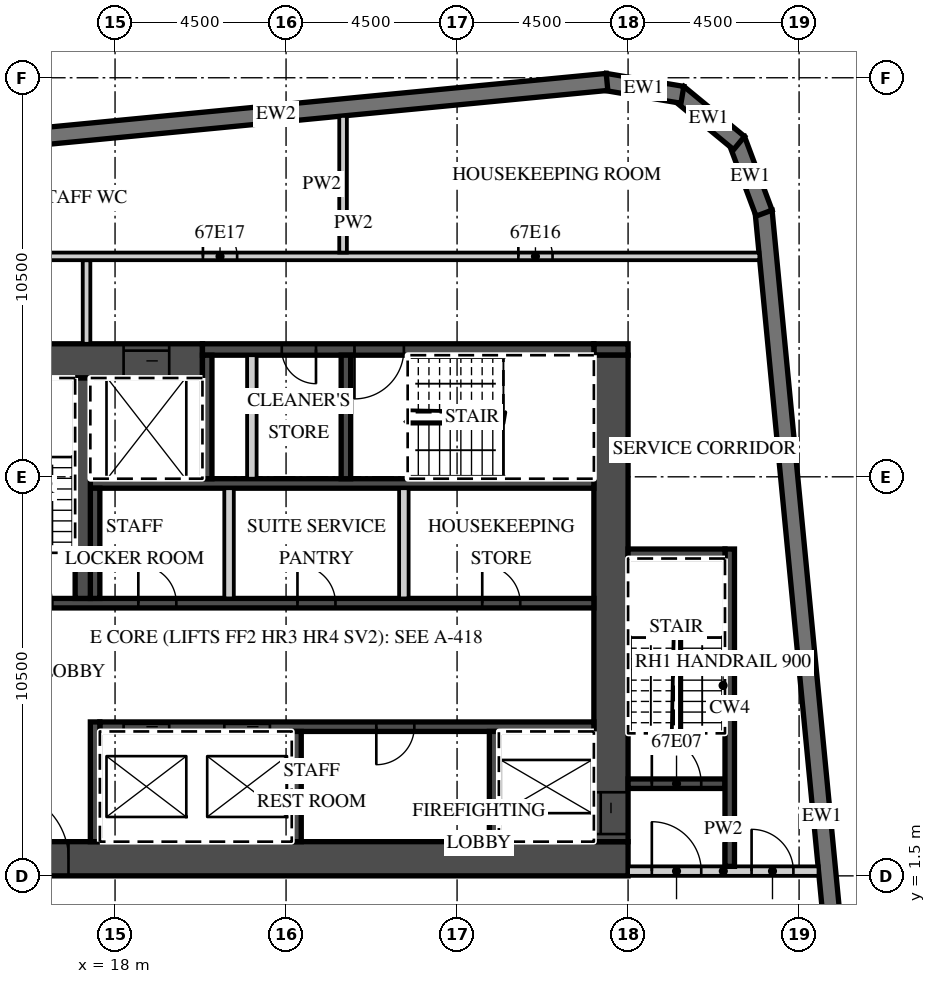
"""IFC4 building model, lengths in metres.
Left out: names, types, materials, properties, quantities, classifications, styles, units other than length and angle.
Written with IfcOpenShell. Run it as: python <this file> out.ifc"""

import sys

from ifc_helpers import new_model, si_unit, direction, frame, frame_2d, origin, place, context, subcontext, project, spatial, polyline, rectangle, outline, extrude, element, fill, save


model = new_model("IFC4")
c1 = context("Model", 3, precision=1e-05, world=origin(), true_north=direction((0.0, 1.0)))
c2 = subcontext(c1, "Body", "Model", "MODEL_VIEW")
j1 = project(units=[si_unit("LENGTHUNIT", "METRE"), si_unit("PLANEANGLEUNIT", "RADIAN")], contexts=[c1])
p1 = place(None, origin())
s1 = spatial("IfcSite", under=j1, at=p1, CompositionType="ELEMENT")
p2 = place(p1, origin())
s2 = spatial("IfcBuilding", under=s1, at=p2, CompositionType="ELEMENT")
p3 = place(p2, frame((0.0, 0.0, 271.8)))
s3 = spatial("IfcBuildingStorey", under=s2, at=p3, CompositionType="ELEMENT", Elevation=271.8)
p4 = place(p3, frame((38.132, -12.858, 0.0), z_axis=(0.0, 0.0, 1.0), x_axis=(-0.095847749461, 0.995396006082, 0.0)))
e1 = element("IfcWall", 1, at=p4, inside=s3, PredefinedType="SOLIDWALL", context=c2, shape_type="SweptSolid", body=[
    extrude(rectangle(XDim=32.0, YDim=0.45, at=frame_2d((16.0, 0.0))), origin(), (0.0, 0.0, 1.0), 3.02),
])
p5 = place(p3, frame((35.078, 18.938, 0.0), z_axis=(0.0, 0.0, 1.0), x_axis=(-0.350192909346, 0.936677599948, 0.0)))
e2 = element("IfcWall", 2, at=p5, inside=s3, PredefinedType="SOLIDWALL", context=c2, shape_type="SweptSolid", body=[
    extrude(outline(polyline([(0.0, -0.225), (2.071, -0.225), (1.95, 0.225), (0.121, 0.225), (0.0, -0.225)])), origin(), (0.0, 0.0, 1.0), 3.02),
])
p6 = place(p3, frame((34.421, 20.782, 0.0), z_axis=(0.0, 0.0, 1.0), x_axis=(-0.771593176315, 0.636116318187, 0.0)))
e3 = element("IfcWall", 3, at=p6, inside=s3, PredefinedType="SOLIDWALL", context=c2, shape_type="SweptSolid", body=[
    extrude(outline(polyline([(0.0, -0.225), (2.071, -0.225), (1.95, 0.225), (0.12, 0.225), (0.0, -0.225)])), origin(), (0.0, 0.0, 1.0), 3.02),
])
p7 = place(p3, frame((32.929, 22.051, 0.0), z_axis=(0.0, 0.0, 1.0), x_axis=(-0.986298144721, 0.164972633245, 0.0)))
e4 = element("IfcWall", 4, at=p7, inside=s3, PredefinedType="SOLIDWALL", context=c2, shape_type="SweptSolid", body=[
    extrude(outline(polyline([(0.0, -0.225), (2.07, -0.225), (1.95, 0.225), (0.121, 0.225), (0.0, -0.225)])), origin(), (0.0, 0.0, 1.0), 3.02),
])
p8 = place(p3, frame((30.946, 22.391, 0.0), z_axis=(0.0, 0.0, 1.0), x_axis=(-0.995396397117, -0.095843688398, 0.0)))
e5 = element("IfcWall", 5, at=p8, inside=s3, PredefinedType="SOLIDWALL", context=c2, shape_type="SweptSolid", body=[
    extrude(rectangle(XDim=17.505, YDim=0.45, at=frame_2d((8.752, 0.0))), origin(), (0.0, 0.0, 1.0), 3.02),
])
p9 = place(p3, frame((13.5, 1.95, 0.0), z_axis=(0.0, 0.0, 1.0), x_axis=(1.0, 0.0, 0.0)))
e6 = element("IfcWall", 6, at=p9, inside=s3, PredefinedType="SHEAR", context=c2, shape_type="SweptSolid", body=[
    extrude(rectangle(XDim=18.0, YDim=0.9, at=frame_2d((9.0, 0.0))), origin(), (0.0, 0.0, 1.0), 3.02),
])
p10 = place(p9, frame((1.475, 0.0, 0.0)))
e7 = element("IfcOpeningElement", 7, at=p10, cuts=e6, PredefinedType="OPENING", context=c2, shape_type="SweptSolid", body=[
    extrude(rectangle(XDim=1.8, YDim=2.1, at=frame_2d((0.9, 1.05))), frame((0.0, 0.46, 0.0), z_axis=(0.0, -1.0, 0.0), x_axis=(1.0, 0.0, 0.0)), (0.0, 0.0, 1.0), 0.92),
])
p11 = place(p3, frame((13.5, 15.05, 0.0), z_axis=(0.0, 0.0, 1.0), x_axis=(1.0, 0.0, 0.0)))
e8 = element("IfcWall", 8, at=p11, inside=s3, PredefinedType="SHEAR", context=c2, shape_type="SweptSolid", body=[
    extrude(rectangle(XDim=6.8, YDim=0.9, at=frame_2d((3.4, 0.0))), origin(), (0.0, 0.0, 1.0), 3.02),
])
p12 = place(p11, frame((4.725, 0.0, 0.0)))
e9 = element("IfcOpeningElement", 9, at=p12, cuts=e8, PredefinedType="OPENING", context=c2, shape_type="SweptSolid", body=[
    extrude(rectangle(XDim=1.2, YDim=2.1, at=frame_2d((0.6, 1.05))), frame((0.0, 0.46, 0.0), z_axis=(0.0, -1.0, 0.0), x_axis=(1.0, 0.0, 0.0)), (0.0, 0.0, 1.0), 0.92),
])
p13 = place(p3, frame((30.6, 15.35, 0.0), z_axis=(0.0, 0.0, 1.0), x_axis=(1.0, 0.0, 0.0)))
e10 = element("IfcWall", 10, at=p13, inside=s3, PredefinedType="SHEAR", context=c2, shape_type="SweptSolid", body=[
    extrude(rectangle(XDim=0.9, YDim=0.3, at=frame_2d((0.45, 0.0))), origin(), (0.0, 0.0, 1.0), 3.02),
])
p14 = place(p3, frame((20.3, 15.35, 0.0), z_axis=(0.0, 0.0, 1.0), x_axis=(1.0, 0.0, 0.0)))
e11 = element("IfcWall", 11, at=p14, inside=s3, PredefinedType="SHEAR", context=c2, shape_type="SweptSolid", body=[
    extrude(rectangle(XDim=10.3, YDim=0.3, at=frame_2d((5.15, 0.0))), origin(), (0.0, 0.0, 1.0), 3.02),
])
p15 = place(p14, frame((4.0, 0.0, 0.0)))
e12 = element("IfcOpeningElement", 12, at=p15, cuts=e11, PredefinedType="OPENING", context=c2, shape_type="SweptSolid", body=[
    extrude(rectangle(XDim=1.3, YDim=2.1, at=frame_2d((0.65, 1.05))), frame((0.0, 0.16, 0.0), z_axis=(0.0, -1.0, 0.0), x_axis=(1.0, 0.0, 0.0)), (0.0, 0.0, 1.0), 0.32),
])
p16 = place(p14, frame((2.087, 0.0, 0.0)))
e13 = element("IfcOpeningElement", 13, at=p16, cuts=e11, PredefinedType="OPENING", context=c2, shape_type="SweptSolid", body=[
    extrude(rectangle(XDim=0.9, YDim=2.1, at=frame_2d((0.45, 1.05))), frame((0.0, 0.16, 0.0), z_axis=(0.0, -1.0, 0.0), x_axis=(1.0, 0.0, 0.0)), (0.0, 0.0, 1.0), 0.32),
])
p17 = place(p3, frame((31.05, 2.4, 0.0), z_axis=(0.0, 0.0, 1.0), x_axis=(0.0, 1.0, 0.0)))
e14 = element("IfcWall", 14, at=p17, inside=s3, PredefinedType="SHEAR", context=c2, shape_type="SweptSolid", body=[
    extrude(rectangle(XDim=12.8, YDim=0.9, at=frame_2d((6.4, 0.0))), origin(), (0.0, 0.0, 1.0), 3.02),
])
p18 = place(p17, frame((0.2, 0.0, 0.0)))
e15 = element("IfcOpeningElement", 15, at=p18, cuts=e14, PredefinedType="OPENING", context=c2, shape_type="SweptSolid", body=[
    extrude(rectangle(XDim=1.1, YDim=2.1, at=frame_2d((0.55, 1.05))), frame((0.0, 0.46, 0.0), z_axis=(0.0, -1.0, 0.0), x_axis=(1.0, 0.0, 0.0)), (0.0, 0.0, 1.0), 0.92),
])
p19 = place(p3, frame((17.6, 5.425, 0.0), z_axis=(0.0, 0.0, 1.0), x_axis=(1.0, 0.0, 0.0)))
e16 = element("IfcWall", 16, at=p19, inside=s3, PredefinedType="SHEAR", context=c2, shape_type="SweptSolid", body=[
    extrude(rectangle(XDim=13.0, YDim=0.25, at=frame_2d((6.5, 0.0))), origin(), (0.0, 0.0, 1.0), 3.02),
])
p20 = place(p19, frame((3.275, 0.0, 0.0)))
e17 = element("IfcOpeningElement", 17, at=p20, cuts=e16, PredefinedType="OPENING", context=c2, shape_type="SweptSolid", body=[
    extrude(rectangle(XDim=1.2, YDim=2.1, at=frame_2d((0.6, 1.05))), frame((0.0, 0.135, 0.0), z_axis=(0.0, -1.0, 0.0), x_axis=(1.0, 0.0, 0.0)), (0.0, 0.0, 1.0), 0.27),
])
p21 = place(p19, frame((0.625, 0.0, 0.0)))
e18 = element("IfcOpeningElement", 18, at=p21, cuts=e16, PredefinedType="OPENING", context=c2, shape_type="SweptSolid", body=[
    extrude(rectangle(XDim=1.2, YDim=2.1, at=frame_2d((0.6, 1.05))), frame((0.0, 0.135, 0.0), z_axis=(0.0, -1.0, 0.0), x_axis=(1.0, 0.0, 0.0)), (0.0, 0.0, 1.0), 0.27),
])
p22 = place(p19, frame((7.275, 0.0, 0.0)))
e19 = element("IfcOpeningElement", 19, at=p22, cuts=e16, PredefinedType="OPENING", context=c2, shape_type="SweptSolid", body=[
    extrude(rectangle(XDim=1.0, YDim=2.1, at=frame_2d((0.5, 1.05))), frame((0.0, 0.135, 0.0), z_axis=(0.0, -1.0, 0.0), x_axis=(1.0, 0.0, 0.0)), (0.0, 0.0, 1.0), 0.27),
])
p23 = place(p3, frame((17.475, 2.4, 0.0), z_axis=(0.0, 0.0, 1.0), x_axis=(0.0, 1.0, 0.0)))
e20 = element("IfcWall", 20, at=p23, inside=s3, PredefinedType="SHEAR", context=c2, shape_type="SweptSolid", body=[
    extrude(rectangle(XDim=3.15, YDim=0.25, at=frame_2d((1.575, 0.0))), origin(), (0.0, 0.0, 1.0), 3.02),
])
for number, where, z_axis, x_axis in (
    (21, (27.975, 2.4, 0.0), (0.0, 0.0, 1.0), (0.0, 1.0, 0.0)),
    (22, (22.775, 2.4, 0.0), (0.0, 0.0, 1.0), (0.0, 1.0, 0.0)),
):
    element("IfcWall", number, at=place(p3, frame(where, z_axis=z_axis, x_axis=x_axis)), inside=s3, PredefinedType="SHEAR", context=c2, shape_type="SweptSolid", body=[
        extrude(rectangle(XDim=2.9, YDim=0.25, at=frame_2d((1.45, 0.0))), origin(), (0.0, 0.0, 1.0), 3.02),
    ])
p24 = place(p3, frame((14.4, 8.675, 0.0), z_axis=(0.0, 0.0, 1.0), x_axis=(1.0, 0.0, 0.0)))
e23 = element("IfcWall", 23, at=p24, inside=s3, PredefinedType="SHEAR", context=c2, shape_type="SweptSolid", body=[
    extrude(rectangle(XDim=16.2, YDim=0.25, at=frame_2d((8.1, 0.0))), origin(), (0.0, 0.0, 1.0), 3.02),
])
p25 = place(p24, frame((0.65, 0.0, 0.0)))
e24 = element("IfcOpeningElement", 24, at=p25, cuts=e23, PredefinedType="OPENING", context=c2, shape_type="SweptSolid", body=[
    extrude(rectangle(XDim=1.3, YDim=2.1, at=frame_2d((0.65, 1.05))), frame((0.0, 0.135, 0.0), z_axis=(0.0, -1.0, 0.0), x_axis=(1.0, 0.0, 0.0)), (0.0, 0.0, 1.0), 0.27),
])
p26 = place(p24, frame((13.262, 0.0, 0.0)))
e25 = element("IfcOpeningElement", 25, at=p26, cuts=e23, PredefinedType="OPENING", context=c2, shape_type="SweptSolid", body=[
    extrude(rectangle(XDim=1.0, YDim=2.1, at=frame_2d((0.5, 1.05))), frame((0.0, 0.135, 0.0), z_axis=(0.0, -1.0, 0.0), x_axis=(1.0, 0.0, 0.0)), (0.0, 0.0, 1.0), 0.27),
])
p27 = place(p24, frame((8.4, 0.0, 0.0)))
e26 = element("IfcOpeningElement", 26, at=p27, cuts=e23, PredefinedType="OPENING", context=c2, shape_type="SweptSolid", body=[
    extrude(rectangle(XDim=1.0, YDim=2.1, at=frame_2d((0.5, 1.05))), frame((0.0, 0.135, 0.0), z_axis=(0.0, -1.0, 0.0), x_axis=(1.0, 0.0, 0.0)), (0.0, 0.0, 1.0), 0.27),
])
p28 = place(p24, frame((4.212, 0.0, 0.0)))
e27 = element("IfcOpeningElement", 27, at=p28, cuts=e23, PredefinedType="OPENING", context=c2, shape_type="SweptSolid", body=[
    extrude(rectangle(XDim=1.0, YDim=2.1, at=frame_2d((0.5, 1.05))), frame((0.0, 0.135, 0.0), z_axis=(0.0, -1.0, 0.0), x_axis=(1.0, 0.0, 0.0)), (0.0, 0.0, 1.0), 0.27),
])
p29 = place(p3, frame((17.35, 11.825, 0.0), z_axis=(0.0, 0.0, 1.0), x_axis=(1.0, 0.0, 0.0)))
e28 = element("IfcWall", 28, at=p29, inside=s3, PredefinedType="SHEAR", context=c2, shape_type="SweptSolid", body=[
    extrude(rectangle(XDim=13.25, YDim=0.25, at=frame_2d((6.625, 0.0))), origin(), (0.0, 0.0, 1.0), 3.02),
])
p30 = place(p3, frame((17.475, 8.8, 0.0), z_axis=(0.0, 0.0, 1.0), x_axis=(0.0, 1.0, 0.0)))
e29 = element("IfcWall", 29, at=p30, inside=s3, PredefinedType="SHEAR", context=c2, shape_type="SweptSolid", body=[
    extrude(rectangle(XDim=2.9, YDim=0.25, at=frame_2d((1.45, 0.0))), origin(), (0.0, 0.0, 1.0), 3.02),
])
for number, where, z_axis, x_axis in (
    (30, (25.6, 8.8, 0.0), (0.0, 0.0, 1.0), (0.0, 1.0, 0.0)),
    (31, (21.0, 8.8, 0.0), (0.0, 0.0, 1.0), (0.0, 1.0, 0.0)),
):
    element("IfcWall", number, at=place(p3, frame(where, z_axis=z_axis, x_axis=x_axis)), inside=s3, PredefinedType="PARTITIONING", context=c2, shape_type="SweptSolid", body=[
        extrude(rectangle(XDim=2.9, YDim=0.25, at=frame_2d((1.45, 0.0))), origin(), (0.0, 0.0, 1.0), 3.02),
    ])
p31 = place(p3, frame((17.15, 8.8, 0.0), z_axis=(0.0, 0.0, 1.0), x_axis=(0.0, 1.0, 0.0)))
e32 = element("IfcWall", 32, at=p31, inside=s3, PredefinedType="SHEAR", context=c2, shape_type="SweptSolid", body=[
    extrude(rectangle(XDim=5.8, YDim=0.4, at=frame_2d((2.9, 0.0))), origin(), (0.0, 0.0, 1.0), 3.02),
])
for number, where, z_axis, x_axis in (
    (33, (20.425, 11.95, 0.0), (0.0, 0.0, 1.0), (0.0, 1.0, 0.0)),
    (34, (24.075, 11.95, 0.0), (0.0, 0.0, 1.0), (0.0, 1.0, 0.0)),
):
    element("IfcWall", number, at=place(p3, frame(where, z_axis=z_axis, x_axis=x_axis)), inside=s3, PredefinedType="SHEAR", context=c2, shape_type="SweptSolid", body=[
        extrude(rectangle(XDim=3.25, YDim=0.25, at=frame_2d((1.625, 0.0))), origin(), (0.0, 0.0, 1.0), 3.02),
    ])
p32 = place(p3, frame((21.6, 11.95, 0.0), z_axis=(0.0, 0.0, 1.0), x_axis=(0.0, 1.0, 0.0)))
e35 = element("IfcWall", 35, at=p32, inside=s3, PredefinedType="PARTITIONING", context=c2, shape_type="SweptSolid", body=[
    extrude(rectangle(XDim=3.25, YDim=0.25, at=frame_2d((1.625, 0.0))), origin(), (0.0, 0.0, 1.0), 3.02),
])
p33 = place(p3, frame((31.5, 1.625, 0.0), z_axis=(0.0, 0.0, 1.0), x_axis=(1.0, 0.0, 0.0)))
e36 = element("IfcWall", 36, at=p33, inside=s3, PredefinedType="PARTITIONING", context=c2, shape_type="SweptSolid", body=[
    extrude(rectangle(XDim=5.012, YDim=0.25, at=frame_2d((2.506, 0.0))), origin(), (0.0, 0.0, 1.0), 3.02),
])
p34 = place(p33, frame((0.625, 0.0, 0.0)))
e37 = element("IfcOpeningElement", 37, at=p34, cuts=e36, PredefinedType="OPENING", context=c2, shape_type="SweptSolid", body=[
    extrude(rectangle(XDim=1.3, YDim=2.1, at=frame_2d((0.65, 1.05))), frame((0.0, 0.135, 0.0), z_axis=(0.0, -1.0, 0.0), x_axis=(1.0, 0.0, 0.0)), (0.0, 0.0, 1.0), 0.27),
])
p35 = place(p33, frame((3.25, 0.0, 0.0)))
e38 = element("IfcOpeningElement", 38, at=p35, cuts=e36, PredefinedType="OPENING", context=c2, shape_type="SweptSolid", body=[
    extrude(rectangle(XDim=1.1, YDim=2.1, at=frame_2d((0.55, 1.05))), frame((0.0, 0.135, 0.0), z_axis=(0.0, -1.0, 0.0), x_axis=(1.0, 0.0, 0.0)), (0.0, 0.0, 1.0), 0.27),
])
p36 = place(p3, frame((31.5, 3.925, 0.0), z_axis=(0.0, 0.0, 1.0), x_axis=(1.0, 0.0, 0.0)))
e39 = element("IfcWall", 39, at=p36, inside=s3, PredefinedType="SHEAR", context=c2, shape_type="SweptSolid", body=[
    extrude(rectangle(XDim=2.55, YDim=0.25, at=frame_2d((1.275, 0.0))), origin(), (0.0, 0.0, 1.0), 3.02),
])
p37 = place(p36, frame((0.625, 0.0, 0.0)))
e40 = element("IfcOpeningElement", 40, at=p37, cuts=e39, PredefinedType="OPENING", context=c2, shape_type="SweptSolid", body=[
    extrude(rectangle(XDim=1.3, YDim=2.1, at=frame_2d((0.65, 1.05))), frame((0.0, 0.135, 0.0), z_axis=(0.0, -1.0, 0.0), x_axis=(1.0, 0.0, 0.0)), (0.0, 0.0, 1.0), 0.27),
])
p38 = place(p3, frame((34.175, 1.75, 0.0), z_axis=(0.0, 0.0, 1.0), x_axis=(0.0, 1.0, 0.0)))
e41 = element("IfcWall", 41, at=p38, inside=s3, PredefinedType="SHEAR", context=c2, shape_type="SweptSolid", body=[
    extrude(rectangle(XDim=8.35, YDim=0.25, at=frame_2d((4.175, 0.0))), origin(), (0.0, 0.0, 1.0), 3.02),
])
p39 = place(p3, frame((31.5, 9.975, 0.0), z_axis=(0.0, 0.0, 1.0), x_axis=(1.0, 0.0, 0.0)))
e42 = element("IfcWall", 42, at=p39, inside=s3, PredefinedType="SHEAR", context=c2, shape_type="SweptSolid", body=[
    extrude(rectangle(XDim=2.55, YDim=0.25, at=frame_2d((1.275, 0.0))), origin(), (0.0, 0.0, 1.0), 3.02),
])
p40 = place(p3, frame((17.25, 15.5, 0.0), z_axis=(0.0, 0.0, 1.0), x_axis=(0.0, 1.0, 0.0)))
e43 = element("IfcWall", 43, at=p40, inside=s3, PredefinedType="PARTITIONING", context=c2, shape_type="SweptSolid", body=[
    extrude(rectangle(XDim=2.2, YDim=0.2, at=frame_2d((1.1, 0.0))), origin(), (0.0, 0.0, 1.0), 3.02),
])
p41 = place(p3, frame((13.6, 17.8, 0.0), z_axis=(0.0, 0.0, 1.0), x_axis=(1.0, 0.0, 0.0)))
e44 = element("IfcWall", 44, at=p41, inside=s3, PredefinedType="PARTITIONING", context=c2, shape_type="SweptSolid", body=[
    extrude(rectangle(XDim=21.354, YDim=0.2, at=frame_2d((10.677, 0.0))), origin(), (0.0, 0.0, 1.0), 3.02),
])
p42 = place(p41, frame((15.012, 0.0, 0.0)))
e45 = element("IfcOpeningElement", 45, at=p42, cuts=e44, PredefinedType="OPENING", context=c2, shape_type="SweptSolid", body=[
    extrude(rectangle(XDim=0.9, YDim=2.1, at=frame_2d((0.45, 1.05))), frame((0.0, 0.11, 0.0), z_axis=(0.0, -1.0, 0.0), x_axis=(1.0, 0.0, 0.0)), (0.0, 0.0, 1.0), 0.22),
])
p43 = place(p41, frame((6.712, 0.0, 0.0)))
e46 = element("IfcOpeningElement", 46, at=p43, cuts=e44, PredefinedType="OPENING", context=c2, shape_type="SweptSolid", body=[
    extrude(rectangle(XDim=0.9, YDim=2.1, at=frame_2d((0.45, 1.05))), frame((0.0, 0.11, 0.0), z_axis=(0.0, -1.0, 0.0), x_axis=(1.0, 0.0, 0.0)), (0.0, 0.0, 1.0), 0.22),
])
p44 = place(p3, frame((24.0, 17.9, 0.0), z_axis=(0.0, 0.0, 1.0), x_axis=(0.0, 1.0, 0.0)))
e47 = element("IfcWall", 47, at=p44, inside=s3, PredefinedType="PARTITIONING", context=c2, shape_type="SweptSolid", body=[
    extrude(rectangle(XDim=3.597, YDim=0.2, at=frame_2d((1.798, 0.0))), origin(), (0.0, 0.0, 1.0), 3.02),
])
p45 = place(p20, origin())
e48 = element("IfcDoor", 48, at=p45, inside=s3, OperationType="SLIDING_TO_RIGHT", PredefinedType="DOOR", context=c2, shape_type="SweptSolid", body=[
    extrude(rectangle(XDim=1.2, YDim=2.1, at=frame_2d((0.6, 1.05))), frame((0.0, 0.025, 0.0), z_axis=(0.0, -1.0, 0.0), x_axis=(1.0, 0.0, 0.0)), (0.0, 0.0, 1.0), 0.05),
])
fill(e17, e48)
p46 = place(p21, origin())
e49 = element("IfcDoor", 49, at=p46, inside=s3, OperationType="SLIDING_TO_LEFT", PredefinedType="DOOR", context=c2, shape_type="SweptSolid", body=[
    extrude(rectangle(XDim=1.2, YDim=2.1, at=frame_2d((0.6, 1.05))), frame((0.0, 0.025, 0.0), z_axis=(0.0, -1.0, 0.0), x_axis=(1.0, 0.0, 0.0)), (0.0, 0.0, 1.0), 0.05),
])
fill(e18, e49)
p47 = place(p12, origin())
e50 = element("IfcDoor", 50, at=p47, inside=s3, OperationType="SLIDING_TO_LEFT", PredefinedType="DOOR", context=c2, shape_type="SweptSolid", body=[
    extrude(rectangle(XDim=1.2, YDim=2.1, at=frame_2d((0.6, 1.05))), frame((0.0, 0.025, 0.0), z_axis=(0.0, -1.0, 0.0), x_axis=(1.0, 0.0, 0.0)), (0.0, 0.0, 1.0), 0.05),
])
fill(e9, e50)
p48 = place(p18, origin())
e51 = element("IfcDoor", 51, at=p48, inside=s3, OperationType="SLIDING_TO_LEFT", PredefinedType="DOOR", context=c2, shape_type="SweptSolid", body=[
    extrude(rectangle(XDim=1.1, YDim=2.1, at=frame_2d((0.55, 1.05))), frame((0.0, 0.025, 0.0), z_axis=(0.0, -1.0, 0.0), x_axis=(1.0, 0.0, 0.0)), (0.0, 0.0, 1.0), 0.05),
])
fill(e15, e51)
p49 = place(p10, origin())
e52 = element("IfcDoor", 52, at=p49, inside=s3, OperationType="DOUBLE_DOOR_DOUBLE_SWING", PredefinedType="DOOR", context=c2, shape_type="SweptSolid", body=[
    extrude(rectangle(XDim=1.8, YDim=2.1, at=frame_2d((0.9, 1.05))), frame((0.0, 0.025, 0.0), z_axis=(0.0, -1.0, 0.0), x_axis=(1.0, 0.0, 0.0)), (0.0, 0.0, 1.0), 0.05),
])
fill(e7, e52)
p50 = place(p34, origin())
e53 = element("IfcDoor", 53, at=p50, inside=s3, OperationType="SINGLE_SWING_LEFT", PredefinedType="DOOR", context=c2, shape_type="SweptSolid", body=[
    extrude(rectangle(XDim=1.3, YDim=2.1, at=frame_2d((0.65, 1.05))), frame((0.0, 0.025, 0.0), z_axis=(0.0, -1.0, 0.0), x_axis=(1.0, 0.0, 0.0)), (0.0, 0.0, 1.0), 0.05),
])
fill(e37, e53)
p51 = place(p37, origin())
e54 = element("IfcDoor", 54, at=p51, inside=s3, OperationType="SINGLE_SWING_LEFT", PredefinedType="DOOR", context=c2, shape_type="SweptSolid", body=[
    extrude(rectangle(XDim=1.3, YDim=2.1, at=frame_2d((0.65, 1.05))), frame((0.0, 0.025, 0.0), z_axis=(0.0, -1.0, 0.0), x_axis=(1.0, 0.0, 0.0)), (0.0, 0.0, 1.0), 0.05),
])
fill(e40, e54)
p52 = place(p35, origin())
e55 = element("IfcDoor", 55, at=p52, inside=s3, OperationType="SINGLE_SWING_LEFT", PredefinedType="DOOR", context=c2, shape_type="SweptSolid", body=[
    extrude(rectangle(XDim=1.1, YDim=2.1, at=frame_2d((0.55, 1.05))), frame((0.0, 0.025, 0.0), z_axis=(0.0, -1.0, 0.0), x_axis=(1.0, 0.0, 0.0)), (0.0, 0.0, 1.0), 0.05),
])
fill(e38, e55)
p53 = place(p15, origin())
e56 = element("IfcDoor", 56, at=p53, inside=s3, OperationType="SINGLE_SWING_LEFT", PredefinedType="DOOR", context=c2, shape_type="SweptSolid", body=[
    extrude(rectangle(XDim=1.3, YDim=2.1, at=frame_2d((0.65, 1.05))), frame((0.0, 0.025, 0.0), z_axis=(0.0, -1.0, 0.0), x_axis=(1.0, 0.0, 0.0)), (0.0, 0.0, 1.0), 0.05),
])
fill(e12, e56)
p54 = place(p16, origin())
e57 = element("IfcDoor", 57, at=p54, inside=s3, OperationType="SINGLE_SWING_RIGHT", PredefinedType="DOOR", context=c2, shape_type="SweptSolid", body=[
    extrude(rectangle(XDim=0.9, YDim=2.1, at=frame_2d((0.45, 1.05))), frame((0.0, 0.025, 0.0), z_axis=(0.0, -1.0, 0.0), x_axis=(1.0, 0.0, 0.0)), (0.0, 0.0, 1.0), 0.05),
])
fill(e13, e57)
p55 = place(p26, origin())
e58 = element("IfcDoor", 58, at=p55, inside=s3, OperationType="SINGLE_SWING_LEFT", PredefinedType="DOOR", context=c2, shape_type="SweptSolid", body=[
    extrude(rectangle(XDim=1.0, YDim=2.1, at=frame_2d((0.5, 1.05))), frame((0.0, 0.025, 0.0), z_axis=(0.0, -1.0, 0.0), x_axis=(1.0, 0.0, 0.0)), (0.0, 0.0, 1.0), 0.05),
])
fill(e25, e58)
p56 = place(p27, origin())
e59 = element("IfcDoor", 59, at=p56, inside=s3, OperationType="SINGLE_SWING_LEFT", PredefinedType="DOOR", context=c2, shape_type="SweptSolid", body=[
    extrude(rectangle(XDim=1.0, YDim=2.1, at=frame_2d((0.5, 1.05))), frame((0.0, 0.025, 0.0), z_axis=(0.0, -1.0, 0.0), x_axis=(1.0, 0.0, 0.0)), (0.0, 0.0, 1.0), 0.05),
])
fill(e26, e59)
p57 = place(p28, origin())
e60 = element("IfcDoor", 60, at=p57, inside=s3, OperationType="SINGLE_SWING_LEFT", PredefinedType="DOOR", context=c2, shape_type="SweptSolid", body=[
    extrude(rectangle(XDim=1.0, YDim=2.1, at=frame_2d((0.5, 1.05))), frame((0.0, 0.025, 0.0), z_axis=(0.0, -1.0, 0.0), x_axis=(1.0, 0.0, 0.0)), (0.0, 0.0, 1.0), 0.05),
])
fill(e27, e60)
p58 = place(p22, origin())
e61 = element("IfcDoor", 61, at=p58, inside=s3, OperationType="SINGLE_SWING_LEFT", PredefinedType="DOOR", context=c2, shape_type="SweptSolid", body=[
    extrude(rectangle(XDim=1.0, YDim=2.1, at=frame_2d((0.5, 1.05))), frame((0.0, 0.025, 0.0), z_axis=(0.0, -1.0, 0.0), x_axis=(1.0, 0.0, 0.0)), (0.0, 0.0, 1.0), 0.05),
])
fill(e19, e61)
p59 = place(p42, origin())
e62 = element("IfcDoor", 62, at=p59, inside=s3, OperationType="SINGLE_SWING_LEFT", PredefinedType="DOOR", context=c2, shape_type="SweptSolid", body=[
    extrude(rectangle(XDim=0.9, YDim=2.1, at=frame_2d((0.45, 1.05))), frame((0.0, 0.025, 0.0), z_axis=(0.0, -1.0, 0.0), x_axis=(1.0, 0.0, 0.0)), (0.0, 0.0, 1.0), 0.05),
])
fill(e45, e62)
p60 = place(p43, origin())
e63 = element("IfcDoor", 63, at=p60, inside=s3, OperationType="SINGLE_SWING_LEFT", PredefinedType="DOOR", context=c2, shape_type="SweptSolid", body=[
    extrude(rectangle(XDim=0.9, YDim=2.1, at=frame_2d((0.45, 1.05))), frame((0.0, 0.025, 0.0), z_axis=(0.0, -1.0, 0.0), x_axis=(1.0, 0.0, 0.0)), (0.0, 0.0, 1.0), 0.05),
])
fill(e46, e63)
save(model, sys.argv[1])
